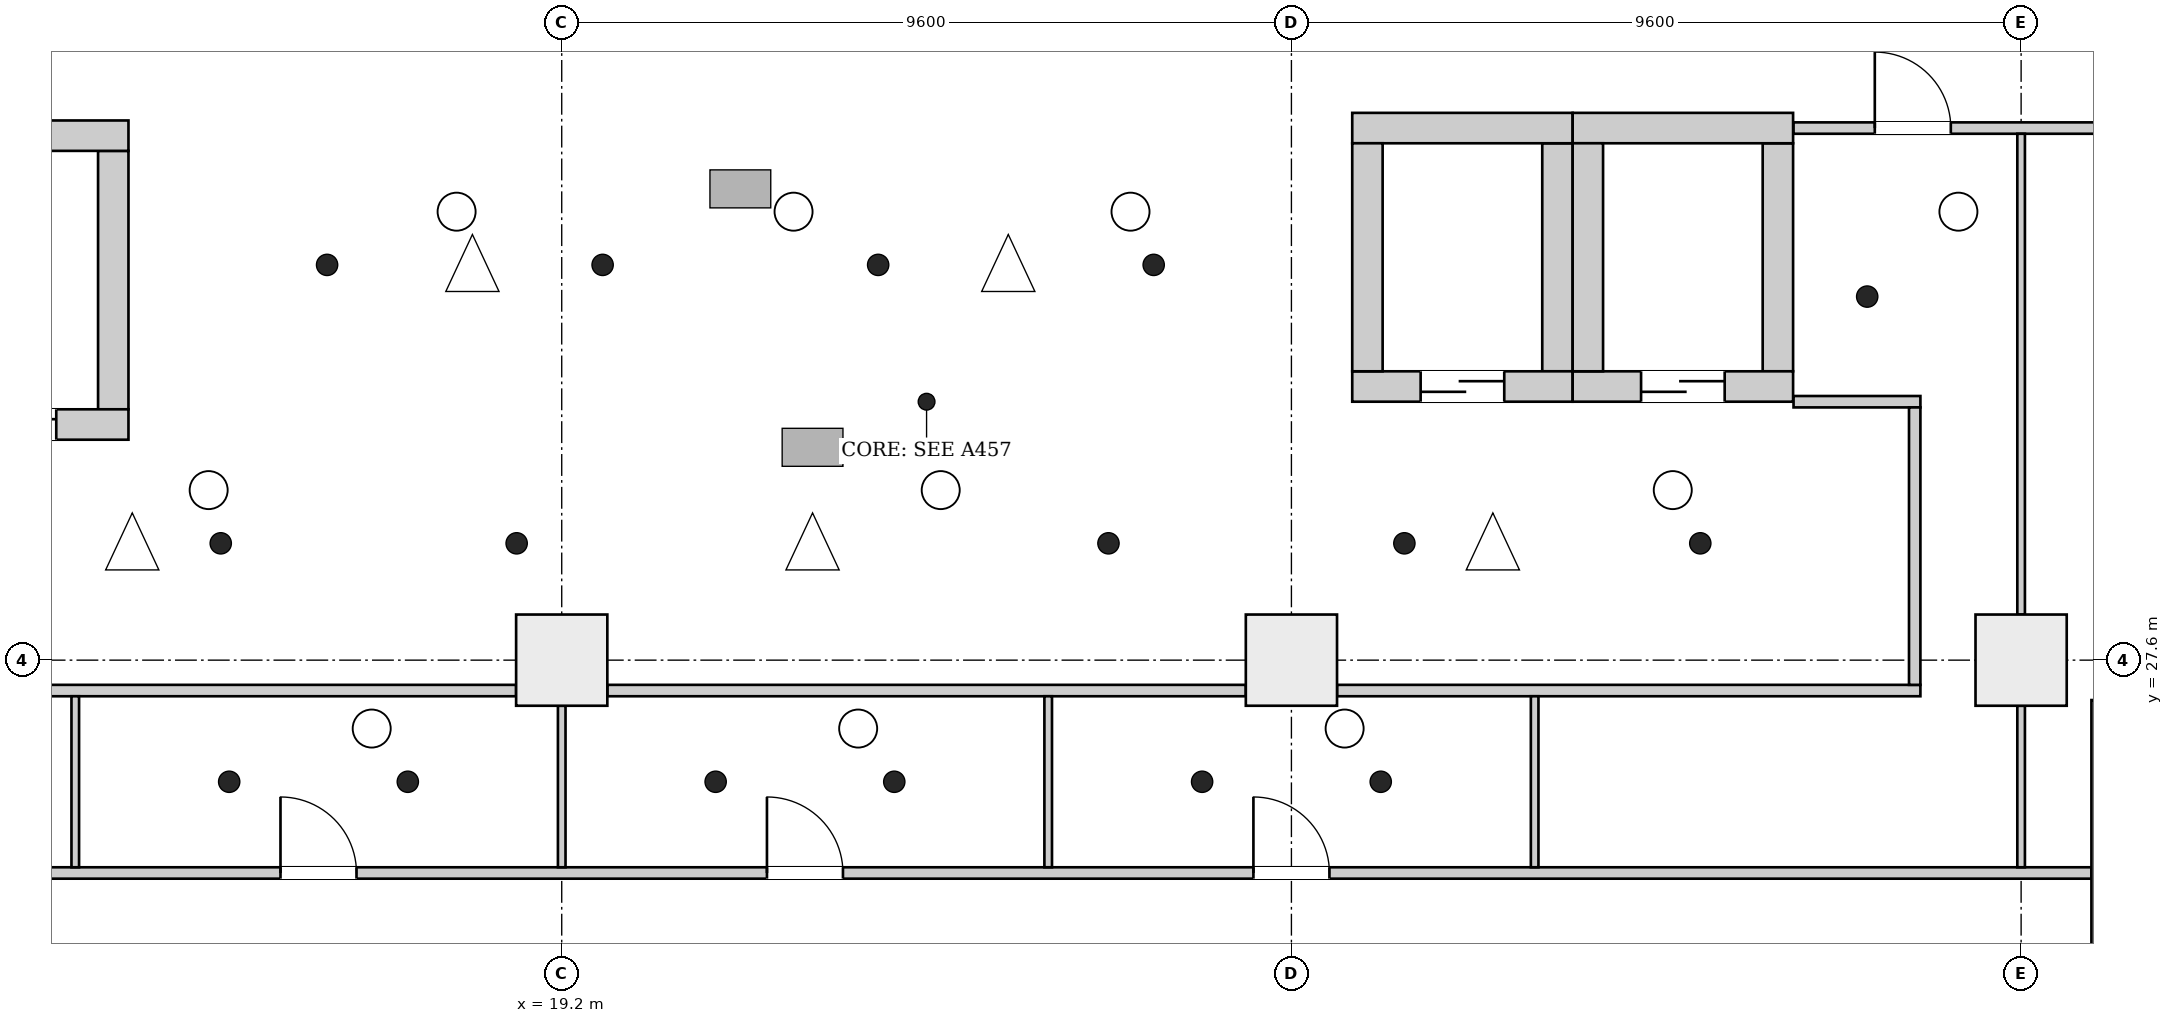
"""IFC4 building model, lengths in metres.
Left out: names, types, materials, properties, quantities, classifications, styles, units other than length and angle.
Written with IfcOpenShell. Run it as: python <this file> out.ifc"""

import sys

from ifc_helpers import new_model, si_unit, direction, frame, frame_2d, origin, origin_2d, place, context, subcontext, project, spatial, rectangle, extrude, element, fill, save


model = new_model("IFC4")
c1 = context("Model", 3, precision=1e-05, world=origin(), true_north=direction((0.0, 1.0)))
c2 = subcontext(c1, "Body", "Model", "MODEL_VIEW")
j1 = project(units=[si_unit("LENGTHUNIT", "METRE"), si_unit("PLANEANGLEUNIT", "RADIAN")], contexts=[c1])
p1 = place(None, origin())
s1 = spatial("IfcSite", under=j1, at=p1, CompositionType="ELEMENT")
p2 = place(p1, origin())
s2 = spatial("IfcBuilding", under=s1, at=p2, CompositionType="ELEMENT")
p3 = place(p2, frame((0.0, 0.0, 21.7)))
s3 = spatial("IfcBuildingStorey", under=s2, at=p3, CompositionType="ELEMENT", Elevation=21.7)
p4 = place(p3, frame((10.4, 30.7, 0.0), z_axis=(0.0, 0.0, 1.0), x_axis=(1.0, 0.0, 0.0)))
e1 = element("IfcWall", 1, at=p4, inside=s3, PredefinedType="SHEAR", context=c2, shape_type="SweptSolid", body=[
    extrude(rectangle(XDim=3.1, YDim=0.4, at=frame_2d((1.55, 0.0))), origin(), (0.0, 0.0, 1.0), 5.0),
])
p5 = place(p4, frame((0.95, 0.0, 0.0)))
e2 = element("IfcOpeningElement", 2, at=p5, cuts=e1, PredefinedType="OPENING", context=c2, shape_type="SweptSolid", body=[
    extrude(rectangle(XDim=1.2, YDim=2.1, at=frame_2d((0.6, 1.05))), frame((0.0, 0.21, 0.0), z_axis=(0.0, -1.0, 0.0), x_axis=(1.0, 0.0, 0.0)), (0.0, 0.0, 1.0), 0.42),
])
p6 = place(p3, frame((10.4, 34.5, 0.0), z_axis=(0.0, 0.0, 1.0), x_axis=(1.0, 0.0, 0.0)))
e3 = element("IfcWall", 3, at=p6, inside=s3, PredefinedType="SHEAR", context=c2, shape_type="SweptSolid", body=[
    extrude(rectangle(XDim=3.1, YDim=0.4, at=frame_2d((1.55, 0.0))), origin(), (0.0, 0.0, 1.0), 5.0),
])
p7 = place(p3, frame((13.3, 30.9, 0.0), z_axis=(0.0, 0.0, 1.0), x_axis=(0.0, 1.0, 0.0)))
e4 = element("IfcWall", 4, at=p7, inside=s3, PredefinedType="SHEAR", context=c2, shape_type="SweptSolid", body=[
    extrude(rectangle(XDim=3.4, YDim=0.4, at=frame_2d((1.7, 0.0))), origin(), (0.0, 0.0, 1.0), 5.0),
])
p8 = place(p3, frame((29.6, 31.2, 0.0), z_axis=(0.0, 0.0, 1.0), x_axis=(1.0, 0.0, 0.0)))
e5 = element("IfcWall", 5, at=p8, inside=s3, PredefinedType="SHEAR", context=c2, shape_type="SweptSolid", body=[
    extrude(rectangle(XDim=2.9, YDim=0.4, at=frame_2d((1.45, 0.0))), origin(), (0.0, 0.0, 1.0), 5.0),
])
p9 = place(p8, frame((0.9, 0.0, 0.0)))
e6 = element("IfcOpeningElement", 6, at=p9, cuts=e5, PredefinedType="OPENING", context=c2, shape_type="SweptSolid", body=[
    extrude(rectangle(XDim=1.1, YDim=2.1, at=frame_2d((0.55, 1.05))), frame((0.0, 0.21, 0.0), z_axis=(0.0, -1.0, 0.0), x_axis=(1.0, 0.0, 0.0)), (0.0, 0.0, 1.0), 0.42),
])
p10 = place(p3, frame((29.6, 34.6, 0.0), z_axis=(0.0, 0.0, 1.0), x_axis=(1.0, 0.0, 0.0)))
e7 = element("IfcWall", 7, at=p10, inside=s3, PredefinedType="SHEAR", context=c2, shape_type="SweptSolid", body=[
    extrude(rectangle(XDim=2.9, YDim=0.4, at=frame_2d((1.45, 0.0))), origin(), (0.0, 0.0, 1.0), 5.0),
])
for number, where, z_axis, x_axis in (
    (8, (29.8, 31.4, 0.0), (0.0, 0.0, 1.0), (0.0, 1.0, 0.0)),
    (9, (32.3, 31.4, 0.0), (0.0, 0.0, 1.0), (0.0, 1.0, 0.0)),
):
    element("IfcWall", number, at=place(p3, frame(where, z_axis=z_axis, x_axis=x_axis)), inside=s3, PredefinedType="SHEAR", context=c2, shape_type="SweptSolid", body=[
        extrude(rectangle(XDim=3.0, YDim=0.4, at=frame_2d((1.5, 0.0))), origin(), (0.0, 0.0, 1.0), 5.0),
    ])
p11 = place(p3, frame((32.5, 31.2, 0.0), z_axis=(0.0, 0.0, 1.0), x_axis=(1.0, 0.0, 0.0)))
e10 = element("IfcWall", 10, at=p11, inside=s3, PredefinedType="SHEAR", context=c2, shape_type="SweptSolid", body=[
    extrude(rectangle(XDim=2.9, YDim=0.4, at=frame_2d((1.45, 0.0))), origin(), (0.0, 0.0, 1.0), 5.0),
])
p12 = place(p11, frame((0.9, 0.0, 0.0)))
e11 = element("IfcOpeningElement", 11, at=p12, cuts=e10, PredefinedType="OPENING", context=c2, shape_type="SweptSolid", body=[
    extrude(rectangle(XDim=1.1, YDim=2.1, at=frame_2d((0.55, 1.05))), frame((0.0, 0.21, 0.0), z_axis=(0.0, -1.0, 0.0), x_axis=(1.0, 0.0, 0.0)), (0.0, 0.0, 1.0), 0.42),
])
p13 = place(p3, frame((32.5, 34.6, 0.0), z_axis=(0.0, 0.0, 1.0), x_axis=(1.0, 0.0, 0.0)))
e12 = element("IfcWall", 12, at=p13, inside=s3, PredefinedType="SHEAR", context=c2, shape_type="SweptSolid", body=[
    extrude(rectangle(XDim=2.9, YDim=0.4, at=frame_2d((1.45, 0.0))), origin(), (0.0, 0.0, 1.0), 5.0),
])
for number, where, z_axis, x_axis in (
    (13, (32.7, 31.4, 0.0), (0.0, 0.0, 1.0), (0.0, 1.0, 0.0)),
    (14, (35.2, 31.4, 0.0), (0.0, 0.0, 1.0), (0.0, 1.0, 0.0)),
):
    element("IfcWall", number, at=place(p3, frame(where, z_axis=z_axis, x_axis=x_axis)), inside=s3, PredefinedType="SHEAR", context=c2, shape_type="SweptSolid", body=[
        extrude(rectangle(XDim=3.0, YDim=0.4, at=frame_2d((1.5, 0.0))), origin(), (0.0, 0.0, 1.0), 5.0),
    ])
for number, where, z_axis, x_axis in (
    (15, (19.2, 27.6, 0.0), (0.0, 0.0, 1.0), (1.0, 0.0, 0.0)),
    (16, (28.8, 27.6, 0.0), (0.0, 0.0, 1.0), (1.0, 0.0, 0.0)),
    (17, (38.4, 27.6, 0.0), (0.0, 0.0, 1.0), (1.0, 0.0, 0.0)),
):
    element("IfcColumn", number, at=place(p3, frame(where, z_axis=z_axis, x_axis=x_axis)), inside=s3, PredefinedType="COLUMN", context=c2, shape_type="SweptSolid", body=[
        extrude(rectangle(XDim=1.2, YDim=1.2, at=origin_2d()), origin(), (0.0, 0.0, 1.0), 5.0),
    ])
p14 = place(p3, frame((0.206, 24.8, 0.0), z_axis=(0.0, 0.0, 1.0), x_axis=(1.0, 0.0, 0.0)))
e18 = element("IfcWall", 18, at=p14, inside=s3, PredefinedType="PARTITIONING", context=c2, shape_type="SweptSolid", body=[
    extrude(rectangle(XDim=39.119, YDim=0.15, at=frame_2d((19.56, 0.0))), origin(), (0.0, 0.0, 1.0), 4.65),
])
p15 = place(p14, frame((15.294, 0.0, 0.0)))
e19 = element("IfcOpeningElement", 19, at=p15, cuts=e18, PredefinedType="OPENING", context=c2, shape_type="SweptSolid", body=[
    extrude(rectangle(XDim=1.0, YDim=2.1, at=frame_2d((0.5, 1.05))), frame((0.0, 0.085, 0.0), z_axis=(0.0, -1.0, 0.0), x_axis=(1.0, 0.0, 0.0)), (0.0, 0.0, 1.0), 0.17),
])
p16 = place(p14, frame((21.694, 0.0, 0.0)))
e20 = element("IfcOpeningElement", 20, at=p16, cuts=e18, PredefinedType="OPENING", context=c2, shape_type="SweptSolid", body=[
    extrude(rectangle(XDim=1.0, YDim=2.1, at=frame_2d((0.5, 1.05))), frame((0.0, 0.085, 0.0), z_axis=(0.0, -1.0, 0.0), x_axis=(1.0, 0.0, 0.0)), (0.0, 0.0, 1.0), 0.17),
])
p17 = place(p14, frame((28.094, 0.0, 0.0)))
e21 = element("IfcOpeningElement", 21, at=p17, cuts=e18, PredefinedType="OPENING", context=c2, shape_type="SweptSolid", body=[
    extrude(rectangle(XDim=1.0, YDim=2.1, at=frame_2d((0.5, 1.05))), frame((0.0, 0.085, 0.0), z_axis=(0.0, -1.0, 0.0), x_axis=(1.0, 0.0, 0.0)), (0.0, 0.0, 1.0), 0.17),
])
p18 = place(p3, frame((10.2, 27.2, 0.0), z_axis=(0.0, 0.0, 1.0), x_axis=(1.0, 0.0, 0.0)))
e22 = element("IfcWall", 22, at=p18, inside=s3, PredefinedType="PARTITIONING", context=c2, shape_type="SweptSolid", body=[
    extrude(rectangle(XDim=8.4, YDim=0.15, at=frame_2d((4.2, 0.0))), origin(), (0.0, 0.0, 1.0), 4.65),
])
p19 = place(p3, frame((12.8, 24.875, 0.0), z_axis=(0.0, 0.0, 1.0), x_axis=(0.0, 1.0, 0.0)))
e23 = element("IfcWall", 23, at=p19, inside=s3, PredefinedType="PARTITIONING", context=c2, shape_type="SweptSolid", body=[
    extrude(rectangle(XDim=2.25, YDim=0.1, at=frame_2d((1.125, 0.0))), origin(), (0.0, 0.0, 1.0), 4.65),
])
p20 = place(p3, frame((19.2, 24.875, 0.0), z_axis=(0.0, 0.0, 1.0), x_axis=(0.0, 1.0, 0.0)))
e24 = element("IfcWall", 24, at=p20, inside=s3, PredefinedType="PARTITIONING", context=c2, shape_type="SweptSolid", body=[
    extrude(rectangle(XDim=2.125, YDim=0.1, at=frame_2d((1.062, 0.0))), origin(), (0.0, 0.0, 1.0), 4.25),
])
p21 = place(p3, frame((19.8, 27.2, 0.0), z_axis=(0.0, 0.0, 1.0), x_axis=(1.0, 0.0, 0.0)))
e25 = element("IfcWall", 25, at=p21, inside=s3, PredefinedType="PARTITIONING", context=c2, shape_type="SweptSolid", body=[
    extrude(rectangle(XDim=8.4, YDim=0.15, at=frame_2d((4.2, 0.0))), origin(), (0.0, 0.0, 1.0), 4.65),
])
p22 = place(p3, frame((25.6, 24.875, 0.0), z_axis=(0.0, 0.0, 1.0), x_axis=(0.0, 1.0, 0.0)))
e26 = element("IfcWall", 26, at=p22, inside=s3, PredefinedType="PARTITIONING", context=c2, shape_type="SweptSolid", body=[
    extrude(rectangle(XDim=2.25, YDim=0.1, at=frame_2d((1.125, 0.0))), origin(), (0.0, 0.0, 1.0), 4.65),
])
p23 = place(p3, frame((29.4, 27.2, 0.0), z_axis=(0.0, 0.0, 1.0), x_axis=(1.0, 0.0, 0.0)))
e27 = element("IfcWall", 27, at=p23, inside=s3, PredefinedType="PARTITIONING", context=c2, shape_type="SweptSolid", body=[
    extrude(rectangle(XDim=7.675, YDim=0.15, at=frame_2d((3.837, 0.0))), origin(), (0.0, 0.0, 1.0), 4.65),
])
p24 = place(p3, frame((32.0, 24.875, 0.0), z_axis=(0.0, 0.0, 1.0), x_axis=(0.0, 1.0, 0.0)))
e28 = element("IfcWall", 28, at=p24, inside=s3, PredefinedType="PARTITIONING", context=c2, shape_type="SweptSolid", body=[
    extrude(rectangle(XDim=2.25, YDim=0.1, at=frame_2d((1.125, 0.0))), origin(), (0.0, 0.0, 1.0), 4.65),
])
p25 = place(p3, frame((35.406, 31.0, 0.0), z_axis=(0.0, 0.0, 1.0), x_axis=(1.0, 0.0, 0.0)))
e29 = element("IfcWall", 29, at=p25, inside=s3, PredefinedType="PARTITIONING", context=c2, shape_type="SweptSolid", body=[
    extrude(rectangle(XDim=1.669, YDim=0.15, at=frame_2d((0.834, 0.0))), origin(), (0.0, 0.0, 1.0), 4.65),
])
p26 = place(p3, frame((35.406, 34.6, 0.0), z_axis=(0.0, 0.0, 1.0), x_axis=(1.0, 0.0, 0.0)))
e30 = element("IfcWall", 30, at=p26, inside=s3, PredefinedType="PARTITIONING", context=c2, shape_type="SweptSolid", body=[
    extrude(rectangle(XDim=21.988, YDim=0.15, at=frame_2d((10.994, 0.0))), origin(), (0.0, 0.0, 1.0), 4.65),
])
p27 = place(p26, frame((1.069, 0.0, 0.0)))
e31 = element("IfcOpeningElement", 31, at=p27, cuts=e30, PredefinedType="OPENING", context=c2, shape_type="SweptSolid", body=[
    extrude(rectangle(XDim=1.0, YDim=2.1, at=frame_2d((0.5, 1.05))), frame((0.0, 0.085, 0.0), z_axis=(0.0, -1.0, 0.0), x_axis=(1.0, 0.0, 0.0)), (0.0, 0.0, 1.0), 0.17),
])
p28 = place(p26, frame((5.694, 0.0, 0.0)))
e32 = element("IfcOpeningElement", 32, at=p28, cuts=e30, PredefinedType="OPENING", context=c2, shape_type="SweptSolid", body=[
    extrude(rectangle(XDim=1.0, YDim=2.1, at=frame_2d((0.5, 1.05))), frame((0.0, 0.085, 0.0), z_axis=(0.0, -1.0, 0.0), x_axis=(1.0, 0.0, 0.0)), (0.0, 0.0, 1.0), 0.17),
])
p29 = place(p26, frame((12.094, 0.0, 0.0)))
e33 = element("IfcOpeningElement", 33, at=p29, cuts=e30, PredefinedType="OPENING", context=c2, shape_type="SweptSolid", body=[
    extrude(rectangle(XDim=1.0, YDim=2.1, at=frame_2d((0.5, 1.05))), frame((0.0, 0.085, 0.0), z_axis=(0.0, -1.0, 0.0), x_axis=(1.0, 0.0, 0.0)), (0.0, 0.0, 1.0), 0.17),
])
p30 = place(p26, frame((18.318, 0.0, 0.0)))
e34 = element("IfcOpeningElement", 34, at=p30, cuts=e30, PredefinedType="OPENING", context=c2, shape_type="SweptSolid", body=[
    extrude(rectangle(XDim=1.0, YDim=2.1, at=frame_2d((0.5, 1.05))), frame((0.0, 0.085, 0.0), z_axis=(0.0, -1.0, 0.0), x_axis=(1.0, 0.0, 0.0)), (0.0, 0.0, 1.0), 0.17),
])
p31 = place(p3, frame((37.0, 27.275, 0.0), z_axis=(0.0, 0.0, 1.0), x_axis=(0.0, 1.0, 0.0)))
e35 = element("IfcWall", 35, at=p31, inside=s3, PredefinedType="PARTITIONING", context=c2, shape_type="SweptSolid", body=[
    extrude(rectangle(XDim=3.65, YDim=0.15, at=frame_2d((1.825, 0.0))), origin(), (0.0, 0.0, 1.0), 4.65),
])
p32 = place(p3, frame((38.4, 24.875, 0.0), z_axis=(0.0, 0.0, 1.0), x_axis=(0.0, 1.0, 0.0)))
e36 = element("IfcWall", 36, at=p32, inside=s3, PredefinedType="PARTITIONING", context=c2, shape_type="SweptSolid", body=[
    extrude(rectangle(XDim=2.125, YDim=0.1, at=frame_2d((1.062, 0.0))), origin(), (0.0, 0.0, 1.0), 4.25),
])
p33 = place(p3, frame((38.4, 28.2, 0.0), z_axis=(0.0, 0.0, 1.0), x_axis=(0.0, 1.0, 0.0)))
e37 = element("IfcWall", 37, at=p33, inside=s3, PredefinedType="PARTITIONING", context=c2, shape_type="SweptSolid", body=[
    extrude(rectangle(XDim=6.325, YDim=0.1, at=frame_2d((3.163, 0.0))), origin(), (0.0, 0.0, 1.0), 4.25),
])
p34 = place(p3, frame((39.4, 19.075, 0.0), z_axis=(0.0, 0.0, 1.0), x_axis=(0.0, 1.0, 0.0)))
e38 = element("IfcWall", 38, at=p34, inside=s3, PredefinedType="PARTITIONING", context=c2, shape_type="SweptSolid", body=[
    extrude(rectangle(XDim=8.0, YDim=0.15, at=frame_2d((4.0, 0.0))), origin(), (0.0, 0.0, 1.0), 4.65),
])
p35 = place(p34, frame((3.425, 0.0, 0.0)))
e39 = element("IfcOpeningElement", 39, at=p35, cuts=e38, PredefinedType="OPENING", context=c2, shape_type="SweptSolid", body=[
    extrude(rectangle(XDim=1.0, YDim=2.1, at=frame_2d((0.5, 1.05))), frame((0.0, 0.085, 0.0), z_axis=(0.0, -1.0, 0.0), x_axis=(1.0, 0.0, 0.0)), (0.0, 0.0, 1.0), 0.17),
])
p36 = place(p5, origin())
e40 = element("IfcDoor", 40, at=p36, inside=s3, OperationType="DOUBLE_DOOR_SLIDING", PredefinedType="DOOR", context=c2, shape_type="SweptSolid", body=[
    extrude(rectangle(XDim=1.2, YDim=2.1, at=frame_2d((0.6, 1.05))), frame((0.0, 0.025, 0.0), z_axis=(0.0, -1.0, 0.0), x_axis=(1.0, 0.0, 0.0)), (0.0, 0.0, 1.0), 0.05),
])
fill(e2, e40)
p37 = place(p9, origin())
e41 = element("IfcDoor", 41, at=p37, inside=s3, OperationType="DOUBLE_DOOR_SLIDING", PredefinedType="DOOR", context=c2, shape_type="SweptSolid", body=[
    extrude(rectangle(XDim=1.1, YDim=2.1, at=frame_2d((0.55, 1.05))), frame((0.0, 0.025, 0.0), z_axis=(0.0, -1.0, 0.0), x_axis=(1.0, 0.0, 0.0)), (0.0, 0.0, 1.0), 0.05),
])
fill(e6, e41)
p38 = place(p12, origin())
e42 = element("IfcDoor", 42, at=p38, inside=s3, OperationType="DOUBLE_DOOR_SLIDING", PredefinedType="DOOR", context=c2, shape_type="SweptSolid", body=[
    extrude(rectangle(XDim=1.1, YDim=2.1, at=frame_2d((0.55, 1.05))), frame((0.0, 0.025, 0.0), z_axis=(0.0, -1.0, 0.0), x_axis=(1.0, 0.0, 0.0)), (0.0, 0.0, 1.0), 0.05),
])
fill(e11, e42)
p39 = place(p15, origin())
e43 = element("IfcDoor", 43, at=p39, inside=s3, OperationType="SINGLE_SWING_LEFT", PredefinedType="DOOR", context=c2, shape_type="SweptSolid", body=[
    extrude(rectangle(XDim=1.0, YDim=2.1, at=frame_2d((0.5, 1.05))), frame((0.0, 0.025, 0.0), z_axis=(0.0, -1.0, 0.0), x_axis=(1.0, 0.0, 0.0)), (0.0, 0.0, 1.0), 0.05),
])
fill(e19, e43)
p40 = place(p16, origin())
e44 = element("IfcDoor", 44, at=p40, inside=s3, OperationType="SINGLE_SWING_RIGHT", PredefinedType="DOOR", context=c2, shape_type="SweptSolid", body=[
    extrude(rectangle(XDim=1.0, YDim=2.1, at=frame_2d((0.5, 1.05))), frame((0.0, 0.025, 0.0), z_axis=(0.0, -1.0, 0.0), x_axis=(1.0, 0.0, 0.0)), (0.0, 0.0, 1.0), 0.05),
])
fill(e20, e44)
p41 = place(p17, origin())
e45 = element("IfcDoor", 45, at=p41, inside=s3, OperationType="SINGLE_SWING_RIGHT", PredefinedType="DOOR", context=c2, shape_type="SweptSolid", body=[
    extrude(rectangle(XDim=1.0, YDim=2.1, at=frame_2d((0.5, 1.05))), frame((0.0, 0.025, 0.0), z_axis=(0.0, -1.0, 0.0), x_axis=(1.0, 0.0, 0.0)), (0.0, 0.0, 1.0), 0.05),
])
fill(e21, e45)
p42 = place(p27, origin())
e46 = element("IfcDoor", 46, at=p42, inside=s3, OperationType="SINGLE_SWING_RIGHT", PredefinedType="DOOR", context=c2, shape_type="SweptSolid", body=[
    extrude(rectangle(XDim=1.0, YDim=2.1, at=frame_2d((0.5, 1.05))), frame((0.0, 0.025, 0.0), z_axis=(0.0, -1.0, 0.0), x_axis=(1.0, 0.0, 0.0)), (0.0, 0.0, 1.0), 0.05),
])
fill(e31, e46)
save(model, sys.argv[1])
